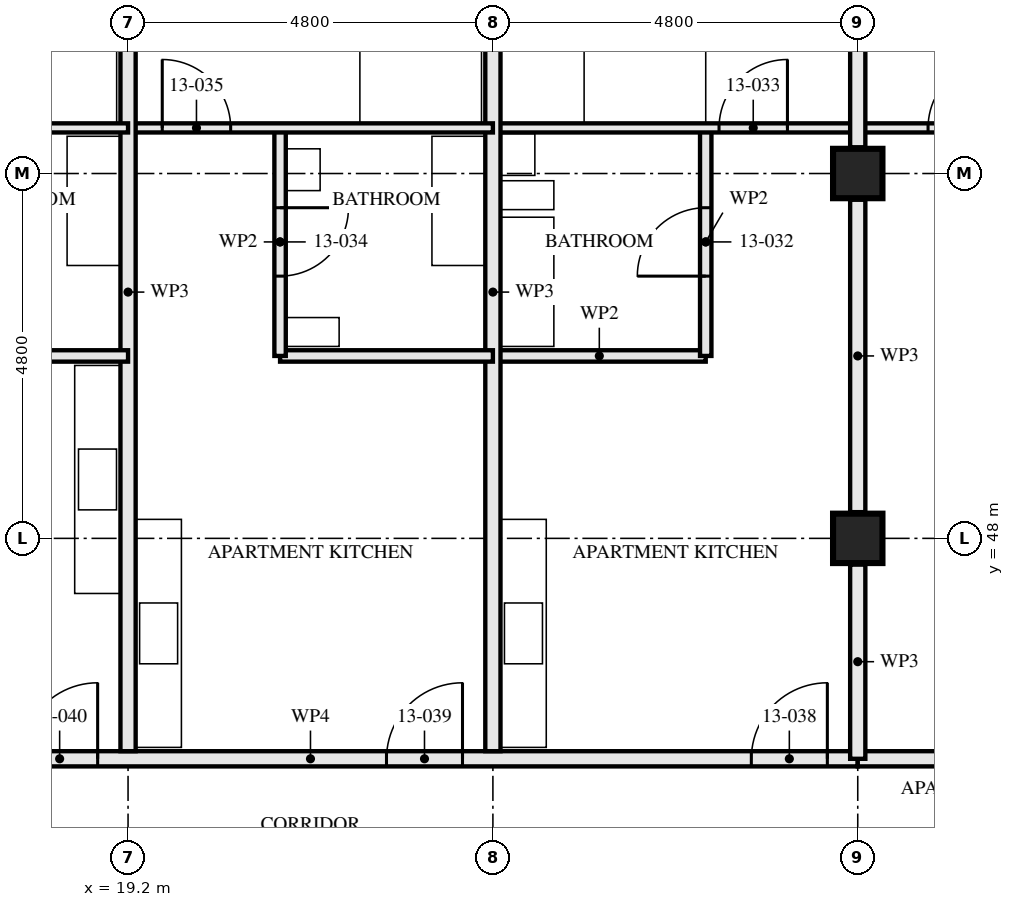
"""IFC4 building model, lengths in metres.
Left out: names, types, materials, properties, quantities, classifications, styles, units other than length and angle.
Written with IfcOpenShell. Run it as: python <this file> out.ifc"""

import sys

from ifc_helpers import new_model, si_unit, direction, frame, frame_2d, origin, origin_2d, place, context, subcontext, project, spatial, rectangle, hollow_rectangle, extrude, element, fill, save


model = new_model("IFC4")
c1 = context("Model", 3, precision=1e-05, world=origin(), true_north=direction((0.0, 1.0)))
c2 = subcontext(c1, "Body", "Model", "MODEL_VIEW")
j1 = project(units=[si_unit("LENGTHUNIT", "METRE"), si_unit("PLANEANGLEUNIT", "RADIAN")], contexts=[c1])
p1 = place(None, origin())
s1 = spatial("IfcSite", under=j1, at=p1, CompositionType="ELEMENT")
p2 = place(p1, origin())
s2 = spatial("IfcBuilding", under=s1, at=p2, CompositionType="ELEMENT")
p3 = place(p2, frame((0.0, 0.0, 51.5)))
s3 = spatial("IfcBuildingStorey", under=s2, at=p3, CompositionType="ELEMENT", Elevation=51.5)
for number, where, z_axis, x_axis in (
    (1, (28.8, 48.0, 0.0), (0.0, 0.0, 1.0), (1.0, 0.0, 0.0)),
    (2, (28.8, 52.8, 0.0), (0.0, 0.0, 1.0), (1.0, 0.0, 0.0)),
):
    element("IfcColumn", number, at=place(p3, frame(where, z_axis=z_axis, x_axis=x_axis)), inside=s3, PredefinedType="COLUMN", context=c2, shape_type="SweptSolid", body=[
        extrude(hollow_rectangle(XDim=0.65, YDim=0.65, WallThickness=0.05, at=origin_2d()), origin(), (0.0, 0.0, 1.0), 3.5),
    ])
p4 = place(p3, frame((26.8, 53.4, 0.0), z_axis=(0.0, 0.0, 1.0), x_axis=(0.0, -1.0, 0.0)))
e3 = element("IfcWall", 3, at=p4, inside=s3, PredefinedType="PARTITIONING", context=c2, shape_type="SweptSolid", body=[
    extrude(rectangle(XDim=3.0, YDim=0.15, at=frame_2d((1.5, 0.0))), origin(), (0.0, 0.0, 1.0), 2.55),
])
p5 = place(p4, frame((1.05, 0.0, 0.0)))
e4 = element("IfcOpeningElement", 4, at=p5, cuts=e3, PredefinedType="OPENING", context=c2, shape_type="SweptSolid", body=[
    extrude(rectangle(XDim=0.9, YDim=2.1, at=frame_2d((0.45, 1.05))), frame((0.0, 0.085, 0.0), z_axis=(0.0, -1.0, 0.0), x_axis=(1.0, 0.0, 0.0)), (0.0, 0.0, 1.0), 0.171),
])
p6 = place(p3, frame((26.8, 50.4, 0.0), z_axis=(0.0, 0.0, 1.0), x_axis=(-1.0, 0.0, 0.0)))
e5 = element("IfcWall", 5, at=p6, inside=s3, PredefinedType="PARTITIONING", context=c2, shape_type="SweptSolid", body=[
    extrude(rectangle(XDim=2.8, YDim=0.15, at=frame_2d((1.4, 0.0))), origin(), (0.0, 0.0, 1.0), 3.33),
])
p7 = place(p3, frame((28.8, 53.4, 0.0), z_axis=(0.0, 0.0, 1.0), x_axis=(-1.0, 0.0, 0.0)))
e6 = element("IfcWall", 6, at=p7, inside=s3, PredefinedType="PARTITIONING", context=c2, shape_type="SweptSolid", body=[
    extrude(rectangle(XDim=4.8, YDim=0.12, at=frame_2d((2.4, 0.0))), origin(), (0.0, 0.0, 1.0), 3.33),
])
p8 = place(p7, frame((0.925, 0.0, 0.0)))
e7 = element("IfcOpeningElement", 7, at=p8, cuts=e6, PredefinedType="OPENING", context=c2, shape_type="SweptSolid", body=[
    extrude(rectangle(XDim=0.9, YDim=2.1, at=frame_2d((0.45, 1.05))), frame((0.0, 0.071, 0.0), z_axis=(0.0, -1.0, 0.0), x_axis=(1.0, 0.0, 0.0)), (0.0, 0.0, 1.0), 0.141),
])
p9 = place(p3, frame((24.0, 57.28, 0.0), z_axis=(0.0, 0.0, 1.0), x_axis=(0.0, -1.0, 0.0)))
e8 = element("IfcWall", 8, at=p9, inside=s3, PredefinedType="PARTITIONING", context=c2, shape_type="SweptSolid", body=[
    extrude(rectangle(XDim=12.08, YDim=0.2, at=frame_2d((6.04, 0.0))), origin(), (0.0, 0.0, 1.0), 2.55),
])
p10 = place(p3, frame((21.2, 53.4, 0.0), z_axis=(0.0, 0.0, 1.0), x_axis=(0.0, -1.0, 0.0)))
e9 = element("IfcWall", 9, at=p10, inside=s3, PredefinedType="PARTITIONING", context=c2, shape_type="SweptSolid", body=[
    extrude(rectangle(XDim=3.0, YDim=0.15, at=frame_2d((1.5, 0.0))), origin(), (0.0, 0.0, 1.0), 2.55),
])
p11 = place(p10, frame((1.05, 0.0, 0.0)))
e10 = element("IfcOpeningElement", 10, at=p11, cuts=e9, PredefinedType="OPENING", context=c2, shape_type="SweptSolid", body=[
    extrude(rectangle(XDim=0.9, YDim=2.1, at=frame_2d((0.45, 1.05))), frame((0.0, 0.085, 0.0), z_axis=(0.0, -1.0, 0.0), x_axis=(1.0, 0.0, 0.0)), (0.0, 0.0, 1.0), 0.171),
])
p12 = place(p3, frame((24.0, 50.4, 0.0), z_axis=(0.0, 0.0, 1.0), x_axis=(-1.0, 0.0, 0.0)))
e11 = element("IfcWall", 11, at=p12, inside=s3, PredefinedType="PARTITIONING", context=c2, shape_type="SweptSolid", body=[
    extrude(rectangle(XDim=2.8, YDim=0.15, at=frame_2d((1.4, 0.0))), origin(), (0.0, 0.0, 1.0), 3.33),
])
p13 = place(p3, frame((24.0, 53.4, 0.0), z_axis=(0.0, 0.0, 1.0), x_axis=(-1.0, 0.0, 0.0)))
e12 = element("IfcWall", 12, at=p13, inside=s3, PredefinedType="PARTITIONING", context=c2, shape_type="SweptSolid", body=[
    extrude(rectangle(XDim=4.8, YDim=0.12, at=frame_2d((2.4, 0.0))), origin(), (0.0, 0.0, 1.0), 3.33),
])
p14 = place(p13, frame((3.45, 0.0, 0.0)))
e13 = element("IfcOpeningElement", 13, at=p14, cuts=e12, PredefinedType="OPENING", context=c2, shape_type="SweptSolid", body=[
    extrude(rectangle(XDim=0.9, YDim=2.1, at=frame_2d((0.45, 1.05))), frame((0.0, 0.071, 0.0), z_axis=(0.0, -1.0, 0.0), x_axis=(1.0, 0.0, 0.0)), (0.0, 0.0, 1.0), 0.141),
])
p15 = place(p3, frame((19.2, 57.28, 0.0), z_axis=(0.0, 0.0, 1.0), x_axis=(0.0, -1.0, 0.0)))
e14 = element("IfcWall", 14, at=p15, inside=s3, PredefinedType="PARTITIONING", context=c2, shape_type="SweptSolid", body=[
    extrude(rectangle(XDim=12.08, YDim=0.2, at=frame_2d((6.04, 0.0))), origin(), (0.0, 0.0, 1.0), 2.55),
])
p16 = place(p3, frame((19.2, 50.4, 0.0), z_axis=(0.0, 0.0, 1.0), x_axis=(-1.0, 0.0, 0.0)))
e15 = element("IfcWall", 15, at=p16, inside=s3, PredefinedType="PARTITIONING", context=c2, shape_type="SweptSolid", body=[
    extrude(rectangle(XDim=2.8, YDim=0.15, at=frame_2d((1.4, 0.0))), origin(), (0.0, 0.0, 1.0), 3.33),
])
p17 = place(p3, frame((19.2, 53.4, 0.0), z_axis=(0.0, 0.0, 1.0), x_axis=(-1.0, 0.0, 0.0)))
e16 = element("IfcWall", 16, at=p17, inside=s3, PredefinedType="PARTITIONING", context=c2, shape_type="SweptSolid", body=[
    extrude(rectangle(XDim=4.8, YDim=0.12, at=frame_2d((2.4, 0.0))), origin(), (0.0, 0.0, 1.0), 3.33),
])
p18 = place(p17, frame((2.975, 0.0, 0.0)))
e17 = element("IfcOpeningElement", 17, at=p18, cuts=e16, PredefinedType="OPENING", context=c2, shape_type="SweptSolid", body=[
    extrude(rectangle(XDim=0.9, YDim=2.1, at=frame_2d((0.45, 1.05))), frame((0.0, 0.071, 0.0), z_axis=(0.0, -1.0, 0.0), x_axis=(1.0, 0.0, 0.0)), (0.0, 0.0, 1.0), 0.141),
])
p19 = place(p3, frame((28.8, 45.1, 0.0), z_axis=(0.0, 0.0, 1.0), x_axis=(-1.0, 0.0, 0.0)))
e18 = element("IfcWall", 18, at=p19, inside=s3, PredefinedType="PARTITIONING", context=c2, shape_type="SweptSolid", body=[
    extrude(rectangle(XDim=14.4, YDim=0.2, at=frame_2d((7.2, 0.0))), origin(), (0.0, 0.0, 1.0), 3.33),
])
p20 = place(p19, frame((0.4, 0.0, 0.0)))
e19 = element("IfcOpeningElement", 19, at=p20, cuts=e18, PredefinedType="OPENING", context=c2, shape_type="SweptSolid", body=[
    extrude(rectangle(XDim=1.0, YDim=2.1, at=frame_2d((0.5, 1.05))), frame((0.0, 0.111, 0.0), z_axis=(0.0, -1.0, 0.0), x_axis=(1.0, 0.0, 0.0)), (0.0, 0.0, 1.0), 0.221),
])
p21 = place(p19, frame((5.2, 0.0, 0.0)))
e20 = element("IfcOpeningElement", 20, at=p21, cuts=e18, PredefinedType="OPENING", context=c2, shape_type="SweptSolid", body=[
    extrude(rectangle(XDim=1.0, YDim=2.1, at=frame_2d((0.5, 1.05))), frame((0.0, 0.111, 0.0), z_axis=(0.0, -1.0, 0.0), x_axis=(1.0, 0.0, 0.0)), (0.0, 0.0, 1.0), 0.221),
])
p22 = place(p19, frame((10.0, 0.0, 0.0)))
e21 = element("IfcOpeningElement", 21, at=p22, cuts=e18, PredefinedType="OPENING", context=c2, shape_type="SweptSolid", body=[
    extrude(rectangle(XDim=1.0, YDim=2.1, at=frame_2d((0.5, 1.05))), frame((0.0, 0.111, 0.0), z_axis=(0.0, -1.0, 0.0), x_axis=(1.0, 0.0, 0.0)), (0.0, 0.0, 1.0), 0.221),
])
p23 = place(p3, frame((33.6, 53.4, 0.0), z_axis=(0.0, 0.0, 1.0), x_axis=(-1.0, 0.0, 0.0)))
e22 = element("IfcWall", 22, at=p23, inside=s3, PredefinedType="PARTITIONING", context=c2, shape_type="SweptSolid", body=[
    extrude(rectangle(XDim=4.8, YDim=0.12, at=frame_2d((2.4, 0.0))), origin(), (0.0, 0.0, 1.0), 3.33),
])
p24 = place(p23, frame((2.975, 0.0, 0.0)))
e23 = element("IfcOpeningElement", 23, at=p24, cuts=e22, PredefinedType="OPENING", context=c2, shape_type="SweptSolid", body=[
    extrude(rectangle(XDim=0.9, YDim=2.1, at=frame_2d((0.45, 1.05))), frame((0.0, 0.071, 0.0), z_axis=(0.0, -1.0, 0.0), x_axis=(1.0, 0.0, 0.0)), (0.0, 0.0, 1.0), 0.141),
])
p25 = place(p3, frame((38.4, 45.1, 0.0), z_axis=(0.0, 0.0, 1.0), x_axis=(-1.0, 0.0, 0.0)))
e24 = element("IfcWall", 24, at=p25, inside=s3, PredefinedType="PARTITIONING", context=c2, shape_type="SweptSolid", body=[
    extrude(rectangle(XDim=9.6, YDim=0.2, at=frame_2d((4.8, 0.0))), origin(), (0.0, 0.0, 1.0), 3.33),
])
p26 = place(p25, frame((0.4, 0.0, 0.0)))
e25 = element("IfcOpeningElement", 25, at=p26, cuts=e24, PredefinedType="OPENING", context=c2, shape_type="SweptSolid", body=[
    extrude(rectangle(XDim=1.0, YDim=2.1, at=frame_2d((0.5, 1.05))), frame((0.0, 0.111, 0.0), z_axis=(0.0, -1.0, 0.0), x_axis=(1.0, 0.0, 0.0)), (0.0, 0.0, 1.0), 0.221),
])
p27 = place(p3, frame((28.8, 45.1, 0.0), z_axis=(0.0, 0.0, 1.0), x_axis=(0.0, 1.0, 0.0)))
e26 = element("IfcWall", 26, at=p27, inside=s3, PredefinedType="PARTITIONING", context=c2, shape_type="SweptSolid", body=[
    extrude(rectangle(XDim=2.555, YDim=0.2, at=frame_2d((1.277, 0.0))), origin(), (0.0, 0.0, 1.0), 2.32),
])
p28 = place(p3, frame((28.8, 48.345, 0.0), z_axis=(0.0, 0.0, 1.0), x_axis=(0.0, 1.0, 0.0)))
e27 = element("IfcWall", 27, at=p28, inside=s3, PredefinedType="PARTITIONING", context=c2, shape_type="SweptSolid", body=[
    extrude(rectangle(XDim=4.11, YDim=0.2, at=frame_2d((2.055, 0.0))), origin(), (0.0, 0.0, 1.0), 2.32),
])
p29 = place(p3, frame((28.8, 53.145, 0.0), z_axis=(0.0, 0.0, 1.0), x_axis=(0.0, 1.0, 0.0)))
e28 = element("IfcWall", 28, at=p29, inside=s3, PredefinedType="PARTITIONING", context=c2, shape_type="SweptSolid", body=[
    extrude(rectangle(XDim=4.208, YDim=0.2, at=frame_2d((2.104, 0.0))), origin(), (0.0, 0.0, 1.0), 2.32),
])
p30 = place(p5, frame((0.9, 0.0, 0.0), z_axis=(0.0, 0.0, 1.0), x_axis=(-1.0, 0.0, 0.0)))
e29 = element("IfcDoor", 29, at=p30, inside=s3, OperationType="SINGLE_SWING_RIGHT", PredefinedType="DOOR", context=c2, shape_type="SweptSolid", body=[
    extrude(rectangle(XDim=0.9, YDim=2.1, at=frame_2d((0.45, 1.05))), frame((0.0, 0.022, 0.0), z_axis=(0.0, -1.0, 0.0), x_axis=(1.0, 0.0, 0.0)), (0.0, 0.0, 1.0), 0.044),
])
fill(e4, e29)
p31 = place(p8, frame((0.9, 0.0, 0.0), z_axis=(0.0, 0.0, 1.0), x_axis=(-1.0, 0.0, 0.0)))
e30 = element("IfcDoor", 30, at=p31, inside=s3, OperationType="SINGLE_SWING_LEFT", PredefinedType="DOOR", context=c2, shape_type="SweptSolid", body=[
    extrude(rectangle(XDim=0.9, YDim=2.1, at=frame_2d((0.45, 1.05))), frame((0.0, 0.022, 0.0), z_axis=(0.0, -1.0, 0.0), x_axis=(1.0, 0.0, 0.0)), (0.0, 0.0, 1.0), 0.044),
])
fill(e7, e30)
p32 = place(p11, origin())
e31 = element("IfcDoor", 31, at=p32, inside=s3, OperationType="SINGLE_SWING_RIGHT", PredefinedType="DOOR", context=c2, shape_type="SweptSolid", body=[
    extrude(rectangle(XDim=0.9, YDim=2.1, at=frame_2d((0.45, 1.05))), frame((0.0, 0.022, 0.0), z_axis=(0.0, -1.0, 0.0), x_axis=(1.0, 0.0, 0.0)), (0.0, 0.0, 1.0), 0.044),
])
fill(e10, e31)
p33 = place(p14, frame((0.9, 0.0, 0.0), z_axis=(0.0, 0.0, 1.0), x_axis=(-1.0, 0.0, 0.0)))
e32 = element("IfcDoor", 32, at=p33, inside=s3, OperationType="SINGLE_SWING_RIGHT", PredefinedType="DOOR", context=c2, shape_type="SweptSolid", body=[
    extrude(rectangle(XDim=0.9, YDim=2.1, at=frame_2d((0.45, 1.05))), frame((0.0, 0.022, 0.0), z_axis=(0.0, -1.0, 0.0), x_axis=(1.0, 0.0, 0.0)), (0.0, 0.0, 1.0), 0.044),
])
fill(e13, e32)
p34 = place(p20, frame((1.0, 0.0, 0.0), z_axis=(0.0, 0.0, 1.0), x_axis=(-1.0, 0.0, 0.0)))
e33 = element("IfcDoor", 33, at=p34, inside=s3, OperationType="SINGLE_SWING_LEFT", PredefinedType="DOOR", context=c2, shape_type="SweptSolid", body=[
    extrude(rectangle(XDim=1.0, YDim=2.1, at=frame_2d((0.5, 1.05))), frame((0.0, 0.027, 0.0), z_axis=(0.0, -1.0, 0.0), x_axis=(1.0, 0.0, 0.0)), (0.0, 0.0, 1.0), 0.054),
])
fill(e19, e33)
p35 = place(p21, frame((1.0, 0.0, 0.0), z_axis=(0.0, 0.0, 1.0), x_axis=(-1.0, 0.0, 0.0)))
e34 = element("IfcDoor", 34, at=p35, inside=s3, OperationType="SINGLE_SWING_LEFT", PredefinedType="DOOR", context=c2, shape_type="SweptSolid", body=[
    extrude(rectangle(XDim=1.0, YDim=2.1, at=frame_2d((0.5, 1.05))), frame((0.0, 0.027, 0.0), z_axis=(0.0, -1.0, 0.0), x_axis=(1.0, 0.0, 0.0)), (0.0, 0.0, 1.0), 0.054),
])
fill(e20, e34)
p36 = place(p22, frame((1.0, 0.0, 0.0), z_axis=(0.0, 0.0, 1.0), x_axis=(-1.0, 0.0, 0.0)))
e35 = element("IfcDoor", 35, at=p36, inside=s3, OperationType="SINGLE_SWING_LEFT", PredefinedType="DOOR", context=c2, shape_type="SweptSolid", body=[
    extrude(rectangle(XDim=1.0, YDim=2.1, at=frame_2d((0.5, 1.05))), frame((0.0, 0.027, 0.0), z_axis=(0.0, -1.0, 0.0), x_axis=(1.0, 0.0, 0.0)), (0.0, 0.0, 1.0), 0.054),
])
fill(e21, e35)
p37 = place(p24, frame((0.9, 0.0, 0.0), z_axis=(0.0, 0.0, 1.0), x_axis=(-1.0, 0.0, 0.0)))
e36 = element("IfcDoor", 36, at=p37, inside=s3, OperationType="SINGLE_SWING_LEFT", PredefinedType="DOOR", context=c2, shape_type="SweptSolid", body=[
    extrude(rectangle(XDim=0.9, YDim=2.1, at=frame_2d((0.45, 1.05))), frame((0.0, 0.022, 0.0), z_axis=(0.0, -1.0, 0.0), x_axis=(1.0, 0.0, 0.0)), (0.0, 0.0, 1.0), 0.044),
])
fill(e23, e36)
save(model, sys.argv[1])
